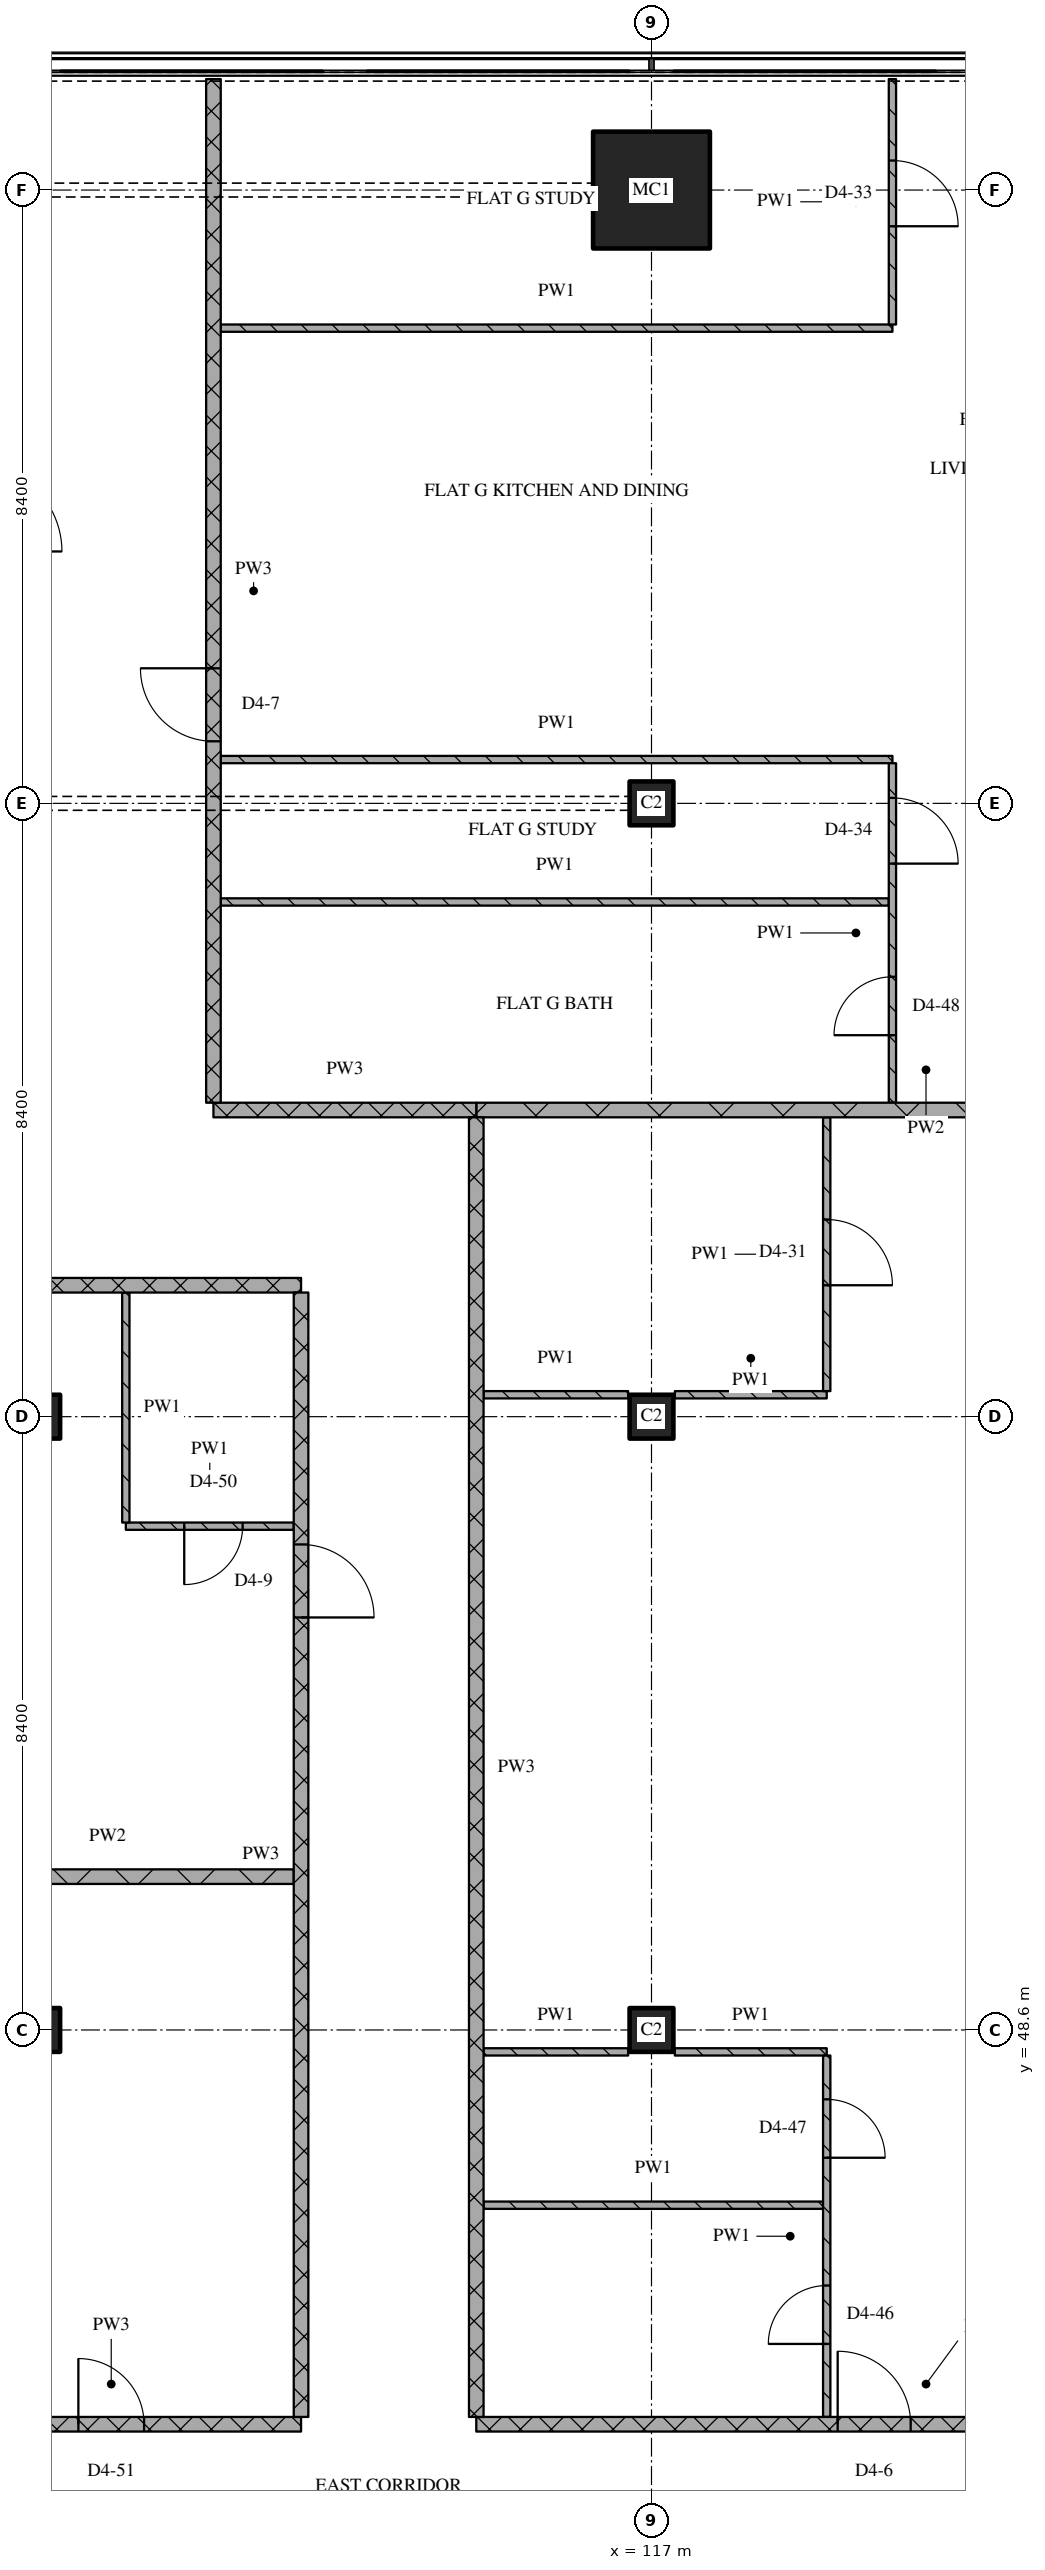
"""IFC4 building model, lengths in metres.
Left out: names, types, materials, properties, quantities, classifications, styles, units other than length and angle.
Written with IfcOpenShell. Run it as: python <this file> out.ifc"""

import sys

from ifc_helpers import new_model, si_unit, direction, frame, frame_2d, origin, origin_2d, place, context, subcontext, project, spatial, rectangle, extrude, element, fill, save


model = new_model("IFC4")
c1 = context("Model", 3, precision=1e-05, world=origin(), true_north=direction((0.0, 1.0)))
c2 = subcontext(c1, "Body", "Model", "MODEL_VIEW")
j1 = project(units=[si_unit("LENGTHUNIT", "METRE"), si_unit("PLANEANGLEUNIT", "RADIAN")], contexts=[c1])
p1 = place(None, origin())
s1 = spatial("IfcSite", under=j1, at=p1, CompositionType="ELEMENT")
p2 = place(p1, origin())
s2 = spatial("IfcBuilding", under=s1, at=p2, CompositionType="ELEMENT")
p3 = place(p2, frame((0.0, 0.0, 241.5)))
s3 = spatial("IfcBuildingStorey", under=s2, at=p3, CompositionType="ELEMENT", Elevation=241.5)
for number, where, z_axis, x_axis in (
    (1, (108.6, 48.6, 0.0), (0.0, 0.0, 1.0), (1.0, 0.0, 0.0)),
    (2, (108.6, 57.0, 0.0), (0.0, 0.0, 1.0), (1.0, 0.0, 0.0)),
    (3, (117.0, 48.6, 0.0), (0.0, 0.0, 1.0), (1.0, 0.0, 0.0)),
    (4, (117.0, 57.0, 0.0), (0.0, 0.0, 1.0), (1.0, 0.0, 0.0)),
    (5, (117.0, 65.4, 0.0), (0.0, 0.0, 1.0), (1.0, 0.0, 0.0)),
):
    element("IfcColumn", number, at=place(p3, frame(where, z_axis=z_axis, x_axis=x_axis)), inside=s3, PredefinedType="COLUMN", context=c2, shape_type="SweptSolid", body=[
        extrude(rectangle(XDim=0.6, YDim=0.6, at=origin_2d()), origin(), (0.0, 0.0, 1.0), 3.6),
    ])
p4 = place(p3, frame((117.0, 73.8, 0.0), z_axis=(0.0, 0.0, 1.0), x_axis=(1.0, 0.0, 0.0)))
e6 = element("IfcColumn", 6, at=p4, inside=s3, PredefinedType="COLUMN", context=c2, shape_type="SweptSolid", body=[
    extrude(rectangle(XDim=1.6, YDim=1.6, at=origin_2d()), origin(), (0.0, 0.0, 1.0), 3.6),
])
p5 = place(p3, frame((107.0, 43.2, 0.0), z_axis=(0.0, 0.0, 1.0), x_axis=(1.0, 0.0, 0.0)))
e7 = element("IfcWall", 7, at=p5, inside=s3, PredefinedType="PARTITIONING", context=c2, shape_type="SweptSolid", body=[
    extrude(rectangle(XDim=5.2, YDim=0.2, at=frame_2d((2.6, 0.0))), origin(), (0.0, 0.0, 1.0), 3.32),
])
p6 = place(p5, frame((2.15, 0.0, 0.0)))
e8 = element("IfcOpeningElement", 8, at=p6, cuts=e7, PredefinedType="OPENING", context=c2, shape_type="SweptSolid", body=[
    extrude(rectangle(XDim=0.9, YDim=2.1, at=frame_2d((0.45, 1.05))), frame((0.0, 0.11, 0.0), z_axis=(0.0, -1.0, 0.0), x_axis=(1.0, 0.0, 0.0)), (0.0, 0.0, 1.0), 0.22),
])
p7 = place(p3, frame((114.6, 43.2, 0.0), z_axis=(0.0, 0.0, 1.0), x_axis=(1.0, 0.0, 0.0)))
e9 = element("IfcWall", 9, at=p7, inside=s3, PredefinedType="PARTITIONING", context=c2, shape_type="SweptSolid", body=[
    extrude(rectangle(XDim=12.32, YDim=0.2, at=frame_2d((6.16, 0.0))), origin(), (0.0, 0.0, 1.0), 3.32),
])
p8 = place(p7, frame((4.95, 0.0, 0.0)))
e10 = element("IfcOpeningElement", 10, at=p8, cuts=e9, PredefinedType="OPENING", context=c2, shape_type="SweptSolid", body=[
    extrude(rectangle(XDim=1.0, YDim=2.1, at=frame_2d((0.5, 1.05))), frame((0.0, 0.11, 0.0), z_axis=(0.0, -1.0, 0.0), x_axis=(1.0, 0.0, 0.0)), (0.0, 0.0, 1.0), 0.22),
])
p9 = place(p3, frame((114.7, 46.2, 0.0), z_axis=(0.0, 0.0, 1.0), x_axis=(1.0, 0.0, 0.0)))
e11 = element("IfcWall", 11, at=p9, inside=s3, PredefinedType="PARTITIONING", context=c2, shape_type="SweptSolid", body=[
    extrude(rectangle(XDim=4.65, YDim=0.1, at=frame_2d((2.325, 0.0))), origin(), (0.0, 0.0, 1.0), 3.32),
])
p10 = place(p3, frame((114.7, 48.3, 0.0), z_axis=(0.0, 0.0, 1.0), x_axis=(1.0, 0.0, 0.0)))
e12 = element("IfcWall", 12, at=p10, inside=s3, PredefinedType="PARTITIONING", context=c2, shape_type="SweptSolid", body=[
    extrude(rectangle(XDim=1.98, YDim=0.1, at=frame_2d((0.99, 0.0))), origin(), (0.0, 0.0, 1.0), 3.32),
])
p11 = place(p3, frame((117.32, 48.3, 0.0), z_axis=(0.0, 0.0, 1.0), x_axis=(1.0, 0.0, 0.0)))
e13 = element("IfcWall", 13, at=p11, inside=s3, PredefinedType="PARTITIONING", context=c2, shape_type="SweptSolid", body=[
    extrude(rectangle(XDim=2.08, YDim=0.1, at=frame_2d((1.04, 0.0))), origin(), (0.0, 0.0, 1.0), 3.32),
])
p12 = place(p3, frame((107.0, 50.7, 0.0), z_axis=(0.0, 0.0, 1.0), x_axis=(1.0, 0.0, 0.0)))
e14 = element("IfcWall", 14, at=p12, inside=s3, PredefinedType="PARTITIONING", context=c2, shape_type="SweptSolid", body=[
    extrude(rectangle(XDim=5.1, YDim=0.2, at=frame_2d((2.55, 0.0))), origin(), (0.0, 0.0, 1.0), 3.32),
])
p13 = place(p3, frame((109.8, 55.5, 0.0), z_axis=(0.0, 0.0, 1.0), x_axis=(1.0, 0.0, 0.0)))
e15 = element("IfcWall", 15, at=p13, inside=s3, PredefinedType="PARTITIONING", context=c2, shape_type="SweptSolid", body=[
    extrude(rectangle(XDim=2.3, YDim=0.1, at=frame_2d((1.15, 0.0))), origin(), (0.0, 0.0, 1.0), 3.32),
])
p14 = place(p13, frame((0.8, 0.0, 0.0)))
e16 = element("IfcOpeningElement", 16, at=p14, cuts=e15, PredefinedType="OPENING", context=c2, shape_type="SweptSolid", body=[
    extrude(rectangle(XDim=0.8, YDim=2.1, at=frame_2d((0.4, 1.05))), frame((0.0, 0.06, 0.0), z_axis=(0.0, -1.0, 0.0), x_axis=(1.0, 0.0, 0.0)), (0.0, 0.0, 1.0), 0.12),
])
p15 = place(p3, frame((114.7, 57.3, 0.0), z_axis=(0.0, 0.0, 1.0), x_axis=(1.0, 0.0, 0.0)))
e17 = element("IfcWall", 17, at=p15, inside=s3, PredefinedType="PARTITIONING", context=c2, shape_type="SweptSolid", body=[
    extrude(rectangle(XDim=1.98, YDim=0.1, at=frame_2d((0.99, 0.0))), origin(), (0.0, 0.0, 1.0), 3.32),
])
p16 = place(p3, frame((117.32, 57.3, 0.0), z_axis=(0.0, 0.0, 1.0), x_axis=(1.0, 0.0, 0.0)))
e18 = element("IfcWall", 18, at=p16, inside=s3, PredefinedType="PARTITIONING", context=c2, shape_type="SweptSolid", body=[
    extrude(rectangle(XDim=2.08, YDim=0.1, at=frame_2d((1.04, 0.0))), origin(), (0.0, 0.0, 1.0), 3.32),
])
p17 = place(p3, frame((101.4, 58.8, 0.0), z_axis=(0.0, 0.0, 1.0), x_axis=(1.0, 0.0, 0.0)))
e19 = element("IfcWall", 19, at=p17, inside=s3, PredefinedType="PARTITIONING", context=c2, shape_type="SweptSolid", body=[
    extrude(rectangle(XDim=10.8, YDim=0.2, at=frame_2d((5.4, 0.0))), origin(), (0.0, 0.0, 1.0), 3.32),
])
p18 = place(p3, frame((111.0, 61.2, 0.0), z_axis=(0.0, 0.0, 1.0), x_axis=(1.0, 0.0, 0.0)))
e20 = element("IfcWall", 20, at=p18, inside=s3, PredefinedType="PARTITIONING", context=c2, shape_type="SweptSolid", body=[
    extrude(rectangle(XDim=3.6, YDim=0.2, at=frame_2d((1.8, 0.0))), origin(), (0.0, 0.0, 1.0), 3.32),
])
p19 = place(p3, frame((114.6, 61.2, 0.0), z_axis=(0.0, 0.0, 1.0), x_axis=(1.0, 0.0, 0.0)))
e21 = element("IfcWall", 21, at=p19, inside=s3, PredefinedType="PARTITIONING", context=c2, shape_type="SweptSolid", body=[
    extrude(rectangle(XDim=12.32, YDim=0.2, at=frame_2d((6.16, 0.0))), origin(), (0.0, 0.0, 1.0), 3.32),
])
p20 = place(p3, frame((111.1, 64.05, 0.0), z_axis=(0.0, 0.0, 1.0), x_axis=(1.0, 0.0, 0.0)))
e22 = element("IfcWall", 22, at=p20, inside=s3, PredefinedType="PARTITIONING", context=c2, shape_type="SweptSolid", body=[
    extrude(rectangle(XDim=9.15, YDim=0.1, at=frame_2d((4.575, 0.0))), origin(), (0.0, 0.0, 1.0), 3.32),
])
for number, where, z_axis, x_axis in (
    (23, (111.1, 66.0, 0.0), (0.0, 0.0, 1.0), (1.0, 0.0, 0.0)),
    (24, (111.1, 71.909, 0.0), (0.0, 0.0, 1.0), (1.0, 0.0, 0.0)),
):
    element("IfcWall", number, at=place(p3, frame(where, z_axis=z_axis, x_axis=x_axis)), inside=s3, PredefinedType="PARTITIONING", context=c2, shape_type="SweptSolid", body=[
        extrude(rectangle(XDim=9.2, YDim=0.1, at=frame_2d((4.6, 0.0))), origin(), (0.0, 0.0, 1.0), 3.32),
    ])
p21 = place(p3, frame((109.8, 58.7, 0.0), z_axis=(0.0, 0.0, 1.0), x_axis=(0.0, -1.0, 0.0)))
e25 = element("IfcWall", 25, at=p21, inside=s3, PredefinedType="PARTITIONING", context=c2, shape_type="SweptSolid", body=[
    extrude(rectangle(XDim=3.15, YDim=0.1, at=frame_2d((1.575, 0.0))), origin(), (0.0, 0.0, 1.0), 3.32),
])
p22 = place(p3, frame((111.0, 75.32, 0.0), z_axis=(0.0, 0.0, 1.0), x_axis=(0.0, -1.0, 0.0)))
e26 = element("IfcWall", 26, at=p22, inside=s3, PredefinedType="PARTITIONING", context=c2, shape_type="SweptSolid", body=[
    extrude(rectangle(XDim=14.02, YDim=0.2, at=frame_2d((7.01, 0.0))), origin(), (0.0, 0.0, 1.0), 3.32),
])
p23 = place(p22, frame((8.07, 0.0, 0.0)))
e27 = element("IfcOpeningElement", 27, at=p23, cuts=e26, PredefinedType="OPENING", context=c2, shape_type="SweptSolid", body=[
    extrude(rectangle(XDim=1.0, YDim=2.1, at=frame_2d((0.5, 1.05))), frame((0.0, 0.11, 0.0), z_axis=(0.0, -1.0, 0.0), x_axis=(1.0, 0.0, 0.0)), (0.0, 0.0, 1.0), 0.22),
])
p24 = place(p3, frame((112.2, 43.3, 0.0), z_axis=(0.0, 0.0, 1.0), x_axis=(0.0, 1.0, 0.0)))
e28 = element("IfcWall", 28, at=p24, inside=s3, PredefinedType="PARTITIONING", context=c2, shape_type="SweptSolid", body=[
    extrude(rectangle(XDim=15.4, YDim=0.2, at=frame_2d((7.7, 0.0))), origin(), (0.0, 0.0, 1.0), 3.32),
])
p25 = place(p24, frame((10.95, 0.0, 0.0)))
e29 = element("IfcOpeningElement", 29, at=p25, cuts=e28, PredefinedType="OPENING", context=c2, shape_type="SweptSolid", body=[
    extrude(rectangle(XDim=1.0, YDim=2.1, at=frame_2d((0.5, 1.05))), frame((0.0, 0.11, 0.0), z_axis=(0.0, -1.0, 0.0), x_axis=(1.0, 0.0, 0.0)), (0.0, 0.0, 1.0), 0.22),
])
p26 = place(p3, frame((114.6, 61.1, 0.0), z_axis=(0.0, 0.0, 1.0), x_axis=(0.0, -1.0, 0.0)))
e30 = element("IfcWall", 30, at=p26, inside=s3, PredefinedType="PARTITIONING", context=c2, shape_type="SweptSolid", body=[
    extrude(rectangle(XDim=17.8, YDim=0.2, at=frame_2d((8.9, 0.0))), origin(), (0.0, 0.0, 1.0), 3.32),
])
p27 = place(p3, frame((119.4, 43.3, 0.0), z_axis=(0.0, 0.0, 1.0), x_axis=(0.0, 1.0, 0.0)))
e31 = element("IfcWall", 31, at=p27, inside=s3, PredefinedType="PARTITIONING", context=c2, shape_type="SweptSolid", body=[
    extrude(rectangle(XDim=4.95, YDim=0.1, at=frame_2d((2.475, 0.0))), origin(), (0.0, 0.0, 1.0), 3.32),
])
p28 = place(p27, frame((1.0, 0.0, 0.0)))
e32 = element("IfcOpeningElement", 32, at=p28, cuts=e31, PredefinedType="OPENING", context=c2, shape_type="SweptSolid", body=[
    extrude(rectangle(XDim=0.8, YDim=2.1, at=frame_2d((0.4, 1.05))), frame((0.0, 0.06, 0.0), z_axis=(0.0, -1.0, 0.0), x_axis=(1.0, 0.0, 0.0)), (0.0, 0.0, 1.0), 0.12),
])
p29 = place(p27, frame((3.55, 0.0, 0.0)))
e33 = element("IfcOpeningElement", 33, at=p29, cuts=e31, PredefinedType="OPENING", context=c2, shape_type="SweptSolid", body=[
    extrude(rectangle(XDim=0.8, YDim=2.1, at=frame_2d((0.4, 1.05))), frame((0.0, 0.06, 0.0), z_axis=(0.0, -1.0, 0.0), x_axis=(1.0, 0.0, 0.0)), (0.0, 0.0, 1.0), 0.12),
])
p30 = place(p3, frame((119.4, 57.35, 0.0), z_axis=(0.0, 0.0, 1.0), x_axis=(0.0, 1.0, 0.0)))
e34 = element("IfcWall", 34, at=p30, inside=s3, PredefinedType="PARTITIONING", context=c2, shape_type="SweptSolid", body=[
    extrude(rectangle(XDim=3.75, YDim=0.1, at=frame_2d((1.875, 0.0))), origin(), (0.0, 0.0, 1.0), 3.32),
])
p31 = place(p30, frame((1.45, 0.0, 0.0)))
e35 = element("IfcOpeningElement", 35, at=p31, cuts=e34, PredefinedType="OPENING", context=c2, shape_type="SweptSolid", body=[
    extrude(rectangle(XDim=0.9, YDim=2.1, at=frame_2d((0.45, 1.05))), frame((0.0, 0.06, 0.0), z_axis=(0.0, -1.0, 0.0), x_axis=(1.0, 0.0, 0.0)), (0.0, 0.0, 1.0), 0.12),
])
p32 = place(p3, frame((120.3, 61.3, 0.0), z_axis=(0.0, 0.0, 1.0), x_axis=(0.0, 1.0, 0.0)))
e36 = element("IfcWall", 36, at=p32, inside=s3, PredefinedType="PARTITIONING", context=c2, shape_type="SweptSolid", body=[
    extrude(rectangle(XDim=4.65, YDim=0.1, at=frame_2d((2.325, 0.0))), origin(), (0.0, 0.0, 1.0), 3.32),
])
p33 = place(p32, frame((0.925, 0.0, 0.0)))
e37 = element("IfcOpeningElement", 37, at=p33, cuts=e36, PredefinedType="OPENING", context=c2, shape_type="SweptSolid", body=[
    extrude(rectangle(XDim=0.8, YDim=2.1, at=frame_2d((0.4, 1.05))), frame((0.0, 0.06, 0.0), z_axis=(0.0, -1.0, 0.0), x_axis=(1.0, 0.0, 0.0)), (0.0, 0.0, 1.0), 0.12),
])
p34 = place(p32, frame((3.275, 0.0, 0.0)))
e38 = element("IfcOpeningElement", 38, at=p34, cuts=e36, PredefinedType="OPENING", context=c2, shape_type="SweptSolid", body=[
    extrude(rectangle(XDim=0.9, YDim=2.1, at=frame_2d((0.45, 1.05))), frame((0.0, 0.06, 0.0), z_axis=(0.0, -1.0, 0.0), x_axis=(1.0, 0.0, 0.0)), (0.0, 0.0, 1.0), 0.12),
])
p35 = place(p3, frame((120.3, 71.958, 0.0), z_axis=(0.0, 0.0, 1.0), x_axis=(0.0, 1.0, 0.0)))
e39 = element("IfcWall", 39, at=p35, inside=s3, PredefinedType="PARTITIONING", context=c2, shape_type="SweptSolid", body=[
    extrude(rectangle(XDim=3.362, YDim=0.1, at=frame_2d((1.681, 0.0))), origin(), (0.0, 0.0, 1.0), 3.32),
])
p36 = place(p35, frame((1.346, 0.0, 0.0)))
e40 = element("IfcOpeningElement", 40, at=p36, cuts=e39, PredefinedType="OPENING", context=c2, shape_type="SweptSolid", body=[
    extrude(rectangle(XDim=0.9, YDim=2.1, at=frame_2d((0.45, 1.05))), frame((0.0, 0.06, 0.0), z_axis=(0.0, -1.0, 0.0), x_axis=(1.0, 0.0, 0.0)), (0.0, 0.0, 1.0), 0.12),
])
p37 = place(p6, origin())
e41 = element("IfcDoor", 41, at=p37, inside=s3, OperationType="SINGLE_SWING_LEFT", PredefinedType="DOOR", context=c2, shape_type="SweptSolid", body=[
    extrude(rectangle(XDim=0.9, YDim=2.1, at=frame_2d((0.45, 1.05))), frame((0.0, 0.025, 0.0), z_axis=(0.0, -1.0, 0.0), x_axis=(1.0, 0.0, 0.0)), (0.0, 0.0, 1.0), 0.05),
])
fill(e8, e41)
p38 = place(p8, origin())
e42 = element("IfcDoor", 42, at=p38, inside=s3, OperationType="SINGLE_SWING_LEFT", PredefinedType="DOOR", context=c2, shape_type="SweptSolid", body=[
    extrude(rectangle(XDim=1.0, YDim=2.1, at=frame_2d((0.5, 1.05))), frame((0.0, 0.025, 0.0), z_axis=(0.0, -1.0, 0.0), x_axis=(1.0, 0.0, 0.0)), (0.0, 0.0, 1.0), 0.05),
])
fill(e10, e42)
p39 = place(p14, origin())
e43 = element("IfcDoor", 43, at=p39, inside=s3, OperationType="SINGLE_SWING_RIGHT", PredefinedType="DOOR", context=c2, shape_type="SweptSolid", body=[
    extrude(rectangle(XDim=0.8, YDim=2.1, at=frame_2d((0.4, 1.05))), frame((0.0, 0.025, 0.0), z_axis=(0.0, -1.0, 0.0), x_axis=(1.0, 0.0, 0.0)), (0.0, 0.0, 1.0), 0.05),
])
fill(e16, e43)
p40 = place(p23, origin())
e44 = element("IfcDoor", 44, at=p40, inside=s3, OperationType="SINGLE_SWING_RIGHT", PredefinedType="DOOR", context=c2, shape_type="SweptSolid", body=[
    extrude(rectangle(XDim=1.0, YDim=2.1, at=frame_2d((0.5, 1.05))), frame((0.0, 0.025, 0.0), z_axis=(0.0, -1.0, 0.0), x_axis=(1.0, 0.0, 0.0)), (0.0, 0.0, 1.0), 0.05),
])
fill(e27, e44)
p41 = place(p25, origin())
e45 = element("IfcDoor", 45, at=p41, inside=s3, OperationType="SINGLE_SWING_RIGHT", PredefinedType="DOOR", context=c2, shape_type="SweptSolid", body=[
    extrude(rectangle(XDim=1.0, YDim=2.1, at=frame_2d((0.5, 1.05))), frame((0.0, 0.025, 0.0), z_axis=(0.0, -1.0, 0.0), x_axis=(1.0, 0.0, 0.0)), (0.0, 0.0, 1.0), 0.05),
])
fill(e29, e45)
p42 = place(p28, origin())
e46 = element("IfcDoor", 46, at=p42, inside=s3, OperationType="SINGLE_SWING_LEFT", PredefinedType="DOOR", context=c2, shape_type="SweptSolid", body=[
    extrude(rectangle(XDim=0.8, YDim=2.1, at=frame_2d((0.4, 1.05))), frame((0.0, 0.025, 0.0), z_axis=(0.0, -1.0, 0.0), x_axis=(1.0, 0.0, 0.0)), (0.0, 0.0, 1.0), 0.05),
])
fill(e32, e46)
p43 = place(p29, origin())
e47 = element("IfcDoor", 47, at=p43, inside=s3, OperationType="SINGLE_SWING_RIGHT", PredefinedType="DOOR", context=c2, shape_type="SweptSolid", body=[
    extrude(rectangle(XDim=0.8, YDim=2.1, at=frame_2d((0.4, 1.05))), frame((0.0, 0.025, 0.0), z_axis=(0.0, -1.0, 0.0), x_axis=(1.0, 0.0, 0.0)), (0.0, 0.0, 1.0), 0.05),
])
fill(e33, e47)
p44 = place(p31, origin())
e48 = element("IfcDoor", 48, at=p44, inside=s3, OperationType="SINGLE_SWING_RIGHT", PredefinedType="DOOR", context=c2, shape_type="SweptSolid", body=[
    extrude(rectangle(XDim=0.9, YDim=2.1, at=frame_2d((0.45, 1.05))), frame((0.0, 0.025, 0.0), z_axis=(0.0, -1.0, 0.0), x_axis=(1.0, 0.0, 0.0)), (0.0, 0.0, 1.0), 0.05),
])
fill(e35, e48)
p45 = place(p33, origin())
e49 = element("IfcDoor", 49, at=p45, inside=s3, OperationType="SINGLE_SWING_LEFT", PredefinedType="DOOR", context=c2, shape_type="SweptSolid", body=[
    extrude(rectangle(XDim=0.8, YDim=2.1, at=frame_2d((0.4, 1.05))), frame((0.0, 0.025, 0.0), z_axis=(0.0, -1.0, 0.0), x_axis=(1.0, 0.0, 0.0)), (0.0, 0.0, 1.0), 0.05),
])
fill(e37, e49)
p46 = place(p34, origin())
e50 = element("IfcDoor", 50, at=p46, inside=s3, OperationType="SINGLE_SWING_RIGHT", PredefinedType="DOOR", context=c2, shape_type="SweptSolid", body=[
    extrude(rectangle(XDim=0.9, YDim=2.1, at=frame_2d((0.45, 1.05))), frame((0.0, 0.025, 0.0), z_axis=(0.0, -1.0, 0.0), x_axis=(1.0, 0.0, 0.0)), (0.0, 0.0, 1.0), 0.05),
])
fill(e38, e50)
p47 = place(p36, origin())
e51 = element("IfcDoor", 51, at=p47, inside=s3, OperationType="SINGLE_SWING_RIGHT", PredefinedType="DOOR", context=c2, shape_type="SweptSolid", body=[
    extrude(rectangle(XDim=0.9, YDim=2.1, at=frame_2d((0.45, 1.05))), frame((0.0, 0.025, 0.0), z_axis=(0.0, -1.0, 0.0), x_axis=(1.0, 0.0, 0.0)), (0.0, 0.0, 1.0), 0.05),
])
fill(e40, e51)
save(model, sys.argv[1])
